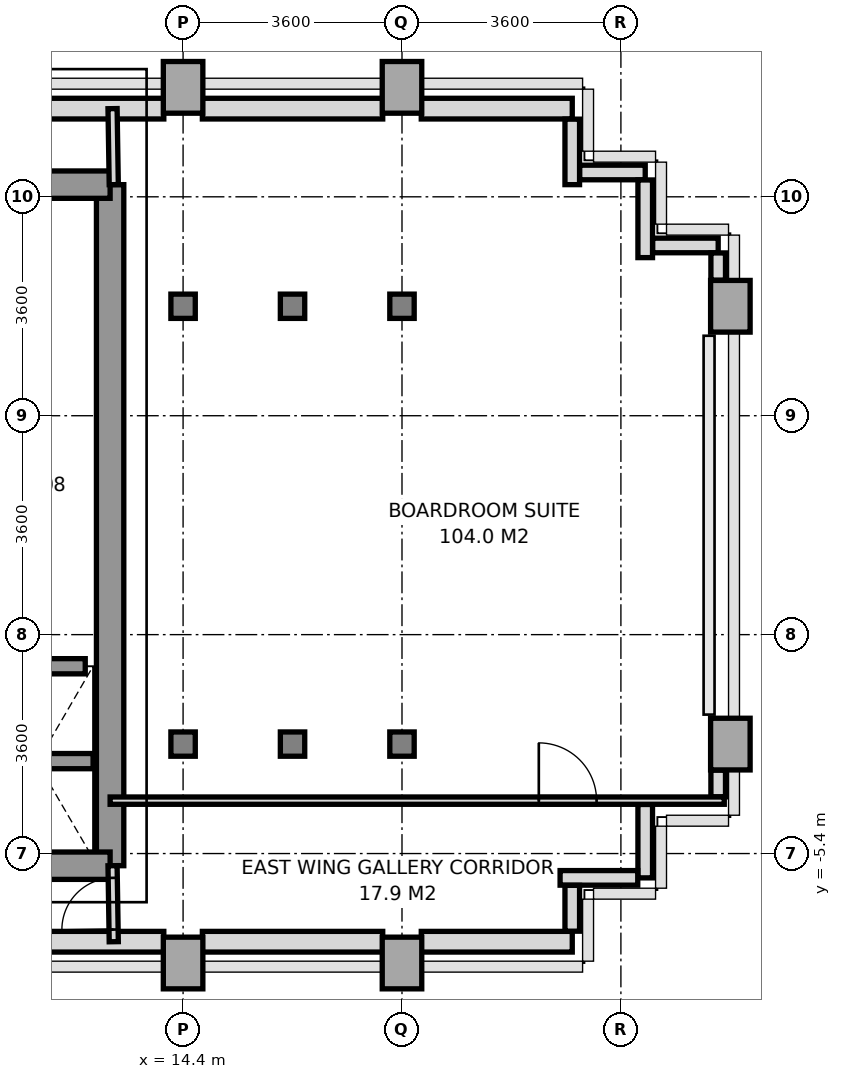
"""IFC4 building model, lengths in metres.
Left out: names, types, materials, properties, quantities, classifications, styles, units other than length and angle.
Written with IfcOpenShell. Run it as: python <this file> out.ifc"""

import sys

from ifc_helpers import new_model, si_unit, direction, frame, frame_2d, origin, origin_2d, place, context, subcontext, project, spatial, rectangle, i_section, extrude, source, transform, mapped, element, fill, save


model = new_model("IFC4")
c1 = context("Model", 3, precision=1e-05, world=origin(), true_north=direction((0.0, 1.0)))
c2 = subcontext(c1, "Body", "Model", "MODEL_VIEW")
j1 = project(units=[si_unit("LENGTHUNIT", "METRE"), si_unit("PLANEANGLEUNIT", "RADIAN")], contexts=[c1])
p1 = place(None, origin())
s1 = spatial("IfcSite", under=j1, at=p1, CompositionType="ELEMENT")
p2 = place(p1, origin())
s2 = spatial("IfcBuilding", under=s1, at=p2, CompositionType="ELEMENT")
p3 = place(p2, frame((0.0, 0.0, 97.2)))
s3 = spatial("IfcBuildingStorey", under=s2, at=p3, CompositionType="ELEMENT", Elevation=97.2)
m1 = source(origin(), c2, "Body", "SweptSolid", [
    extrude(rectangle(XDim=0.65, YDim=0.85, at=origin_2d()), origin(), (0.0, 0.0, 1.0), 3.2),
])
p4 = place(p3, frame((14.4, -7.2, 0.0), z_axis=(0.0, 0.0, 1.0), x_axis=(1.0, 0.0, 0.0)))
e1 = element("IfcColumn", 1, at=p4, inside=s3, PredefinedType="COLUMN", context=c2, shape_type="MappedRepresentation", body=[
    mapped(m1, transform((0.0, 0.0, 0.0), x_axis=(1.0, 0.0, 0.0), y_axis=(0.0, 1.0, 0.0), z_axis=(0.0, 0.0, 1.0), scale=1.0)),
])
m2 = source(origin(), c2, "Body", "SweptSolid", [
    extrude(i_section(OverallWidth=0.401, OverallDepth=0.399, WebThickness=0.02, FlangeThickness=0.032, at=origin_2d()), origin(), (0.0, 0.0, 1.0), 3.2),
])
for number, where, z_axis, x_axis in (
    (2, (14.4, -3.6, 0.0), (0.0, 0.0, 1.0), (1.0, 0.0, 0.0)),
    (3, (14.4, 3.6, 0.0), (0.0, 0.0, 1.0), (1.0, 0.0, 0.0)),
):
    element("IfcColumn", number, at=place(p3, frame(where, z_axis=z_axis, x_axis=x_axis)), inside=s3, PredefinedType="COLUMN", context=c2, shape_type="MappedRepresentation", body=[
        mapped(m2, transform((0.0, 0.0, 0.0), x_axis=(1.0, 0.0, 0.0), y_axis=(0.0, 1.0, 0.0), z_axis=(0.0, 0.0, 1.0), scale=1.0)),
    ])
p5 = place(p3, frame((14.4, 7.2, 0.0), z_axis=(0.0, 0.0, 1.0), x_axis=(1.0, 0.0, 0.0)))
e4 = element("IfcColumn", 4, at=p5, inside=s3, PredefinedType="COLUMN", context=c2, shape_type="MappedRepresentation", body=[
    mapped(m1, transform((0.0, 0.0, 0.0), x_axis=(1.0, 0.0, 0.0), y_axis=(0.0, 1.0, 0.0), z_axis=(0.0, 0.0, 1.0), scale=1.0)),
])
for number, where, z_axis, x_axis in (
    (5, (16.2, -3.6, 0.0), (0.0, 0.0, 1.0), (1.0, 0.0, 0.0)),
    (6, (16.2, 3.6, 0.0), (0.0, 0.0, 1.0), (1.0, 0.0, 0.0)),
):
    element("IfcColumn", number, at=place(p3, frame(where, z_axis=z_axis, x_axis=x_axis)), inside=s3, PredefinedType="COLUMN", context=c2, shape_type="MappedRepresentation", body=[
        mapped(m2, transform((0.0, 0.0, 0.0), x_axis=(1.0, 0.0, 0.0), y_axis=(0.0, 1.0, 0.0), z_axis=(0.0, 0.0, 1.0), scale=1.0)),
    ])
p6 = place(p3, frame((18.0, -7.2, 0.0), z_axis=(0.0, 0.0, 1.0), x_axis=(1.0, 0.0, 0.0)))
e7 = element("IfcColumn", 7, at=p6, inside=s3, PredefinedType="COLUMN", context=c2, shape_type="MappedRepresentation", body=[
    mapped(m1, transform((0.0, 0.0, 0.0), x_axis=(1.0, 0.0, 0.0), y_axis=(0.0, 1.0, 0.0), z_axis=(0.0, 0.0, 1.0), scale=1.0)),
])
for number, where, z_axis, x_axis in (
    (8, (18.0, -3.6, 0.0), (0.0, 0.0, 1.0), (1.0, 0.0, 0.0)),
    (9, (18.0, 3.6, 0.0), (0.0, 0.0, 1.0), (1.0, 0.0, 0.0)),
):
    element("IfcColumn", number, at=place(p3, frame(where, z_axis=z_axis, x_axis=x_axis)), inside=s3, PredefinedType="COLUMN", context=c2, shape_type="MappedRepresentation", body=[
        mapped(m2, transform((0.0, 0.0, 0.0), x_axis=(1.0, 0.0, 0.0), y_axis=(0.0, 1.0, 0.0), z_axis=(0.0, 0.0, 1.0), scale=1.0)),
    ])
for number, where, z_axis, x_axis in (
    (10, (18.0, 7.2, 0.0), (0.0, 0.0, 1.0), (1.0, 0.0, 0.0)),
    (11, (23.4, -3.6, 0.0), (0.0, 0.0, 1.0), (1.0, 0.0, 0.0)),
    (12, (23.4, 3.6, 0.0), (0.0, 0.0, 1.0), (1.0, 0.0, 0.0)),
):
    element("IfcColumn", number, at=place(p3, frame(where, z_axis=z_axis, x_axis=x_axis)), inside=s3, PredefinedType="COLUMN", context=c2, shape_type="MappedRepresentation", body=[
        mapped(m1, transform((0.0, 0.0, 0.0), x_axis=(1.0, 0.0, 0.0), y_axis=(0.0, 1.0, 0.0), z_axis=(0.0, 0.0, 1.0), scale=1.0)),
    ])
p7 = place(p3, frame((11.498, 6.85, 0.0), z_axis=(0.0, 0.0, 1.0), x_axis=(1.0, 0.0, 0.0)))
e13 = element("IfcWall", 13, at=p7, inside=s3, PredefinedType="SOLIDWALL", context=c2, shape_type="SweptSolid", body=[
    extrude(rectangle(XDim=2.585, YDim=0.34, at=frame_2d((1.292, 0.0))), origin(), (0.0, 0.0, 1.0), 3.2),
])
p8 = place(p3, frame((14.717, 6.85, 0.0), z_axis=(0.0, 0.0, 1.0), x_axis=(1.0, 0.0, 0.0)))
e14 = element("IfcWall", 14, at=p8, inside=s3, PredefinedType="SOLIDWALL", context=c2, shape_type="SweptSolid", body=[
    extrude(rectangle(XDim=2.966, YDim=0.34, at=frame_2d((1.483, 0.0))), origin(), (0.0, 0.0, 1.0), 2.45),
])
p9 = place(p3, frame((18.317, 6.85, 0.0), z_axis=(0.0, 0.0, 1.0), x_axis=(1.0, 0.0, 0.0)))
e15 = element("IfcWall", 15, at=p9, inside=s3, PredefinedType="SOLIDWALL", context=c2, shape_type="SweptSolid", body=[
    extrude(rectangle(XDim=2.483, YDim=0.34, at=frame_2d((1.242, 0.0))), origin(), (0.0, 0.0, 1.0), 3.2),
])
p10 = place(p3, frame((11.75, -6.85, 0.0), z_axis=(0.0, 0.0, 1.0), x_axis=(1.0, 0.0, 0.0)))
e16 = element("IfcWall", 16, at=p10, inside=s3, PredefinedType="SOLIDWALL", context=c2, shape_type="SweptSolid", body=[
    extrude(rectangle(XDim=2.333, YDim=0.34, at=frame_2d((1.167, 0.0))), origin(), (0.0, 0.0, 1.0), 3.2),
])
p11 = place(p3, frame((14.717, -6.85, 0.0), z_axis=(0.0, 0.0, 1.0), x_axis=(1.0, 0.0, 0.0)))
e17 = element("IfcWall", 17, at=p11, inside=s3, PredefinedType="SOLIDWALL", context=c2, shape_type="SweptSolid", body=[
    extrude(rectangle(XDim=2.966, YDim=0.34, at=frame_2d((1.483, 0.0))), origin(), (0.0, 0.0, 1.0), 2.45),
])
p12 = place(p3, frame((18.317, -6.85, 0.0), z_axis=(0.0, 0.0, 1.0), x_axis=(1.0, 0.0, 0.0)))
e18 = element("IfcWall", 18, at=p12, inside=s3, PredefinedType="SOLIDWALL", context=c2, shape_type="SweptSolid", body=[
    extrude(rectangle(XDim=2.483, YDim=0.34, at=frame_2d((1.242, 0.0))), origin(), (0.0, 0.0, 1.0), 3.2),
])
p13 = place(p3, frame((22.0, -4.593, 0.0), z_axis=(0.0, 0.0, 1.0), x_axis=(0.0, -1.0, 0.0)))
e19 = element("IfcWall", 19, at=p13, inside=s3, PredefinedType="PARAPET", context=c2, shape_type="SweptSolid", body=[
    extrude(rectangle(XDim=1.207, YDim=0.24, at=frame_2d((0.604, 0.0))), origin(), (0.0, 0.0, 1.0), 1.15),
])
p14 = place(p3, frame((21.877, -5.8, 0.0), z_axis=(0.0, 0.0, 1.0), x_axis=(-1.0, 0.0, 0.0)))
e20 = element("IfcWall", 20, at=p14, inside=s3, PredefinedType="PARAPET", context=c2, shape_type="SweptSolid", body=[
    extrude(rectangle(XDim=1.277, YDim=0.24, at=frame_2d((0.638, 0.0))), origin(), (0.0, 0.0, 1.0), 1.15),
])
p15 = place(p3, frame((20.8, -5.923, 0.0), z_axis=(0.0, 0.0, 1.0), x_axis=(0.0, -1.0, 0.0)))
e21 = element("IfcWall", 21, at=p15, inside=s3, PredefinedType="PARAPET", context=c2, shape_type="SweptSolid", body=[
    extrude(rectangle(XDim=0.754, YDim=0.24, at=frame_2d((0.377, 0.0))), origin(), (0.0, 0.0, 1.0), 1.15),
])
for number, where, z_axis, x_axis in (
    (22, (20.8, 6.677, 0.0), (0.0, 0.0, 1.0), (0.0, -1.0, 0.0)),
    (23, (20.923, 5.8, 0.0), (0.0, 0.0, 1.0), (1.0, 0.0, 0.0)),
):
    element("IfcWall", number, at=place(p3, frame(where, z_axis=z_axis, x_axis=x_axis)), inside=s3, PredefinedType="PARAPET", context=c2, shape_type="SweptSolid", body=[
        extrude(rectangle(XDim=1.077, YDim=0.24, at=frame_2d((0.539, 0.0))), origin(), (0.0, 0.0, 1.0), 1.15),
    ])
p16 = place(p3, frame((22.0, 5.677, 0.0), z_axis=(0.0, 0.0, 1.0), x_axis=(0.0, -1.0, 0.0)))
e24 = element("IfcWall", 24, at=p16, inside=s3, PredefinedType="PARAPET", context=c2, shape_type="SweptSolid", body=[
    extrude(rectangle(XDim=1.277, YDim=0.24, at=frame_2d((0.639, 0.0))), origin(), (0.0, 0.0, 1.0), 1.15),
])
p17 = place(p3, frame((22.123, 4.6, 0.0), z_axis=(0.0, 0.0, 1.0), x_axis=(1.0, 0.0, 0.0)))
e25 = element("IfcWall", 25, at=p17, inside=s3, PredefinedType="PARAPET", context=c2, shape_type="SweptSolid", body=[
    extrude(rectangle(XDim=1.077, YDim=0.24, at=frame_2d((0.539, 0.0))), origin(), (0.0, 0.0, 1.0), 1.15),
])
p18 = place(p3, frame((23.2, 4.477, 0.0), z_axis=(0.0, 0.0, 1.0), x_axis=(0.0, -1.0, 0.0)))
e26 = element("IfcWall", 26, at=p18, inside=s3, PredefinedType="PARAPET", context=c2, shape_type="SweptSolid", body=[
    extrude(rectangle(XDim=0.449, YDim=0.24, at=frame_2d((0.225, 0.0))), origin(), (0.0, 0.0, 1.0), 1.15),
])
p19 = place(p3, frame((23.2, -4.028, 0.0), z_axis=(0.0, 0.0, 1.0), x_axis=(0.0, -1.0, 0.0)))
e27 = element("IfcWall", 27, at=p19, inside=s3, PredefinedType="PARAPET", context=c2, shape_type="SweptSolid", body=[
    extrude(rectangle(XDim=0.439, YDim=0.24, at=frame_2d((0.219, 0.0))), origin(), (0.0, 0.0, 1.0), 1.15),
])
p20 = place(p3, frame((13.2, -5.6, 0.0), z_axis=(0.0, 0.0, 1.0), x_axis=(0.0, 1.0, 0.0)))
e28 = element("IfcWall", 28, at=p20, inside=s3, PredefinedType="SHEAR", context=c2, shape_type="SweptSolid", body=[
    extrude(rectangle(XDim=11.2, YDim=0.45, at=frame_2d((5.6, 0.0))), origin(), (0.0, 0.0, 1.0), 3.2),
])
p21 = place(p3, frame((11.381, 5.6, 0.0), z_axis=(0.0, 0.0, 1.0), x_axis=(1.0, 0.0, 0.0)))
e29 = element("IfcWall", 29, at=p21, inside=s3, PredefinedType="SHEAR", context=c2, shape_type="SweptSolid", body=[
    extrude(rectangle(XDim=1.819, YDim=0.45, at=frame_2d((0.909, 0.0))), origin(), (0.0, 0.0, 1.0), 3.2),
])
p22 = place(p3, frame((5.4, -5.6, 0.0), z_axis=(0.0, 0.0, 1.0), x_axis=(1.0, 0.0, 0.0)))
e30 = element("IfcWall", 30, at=p22, inside=s3, PredefinedType="SHEAR", context=c2, shape_type="SweptSolid", body=[
    extrude(rectangle(XDim=7.8, YDim=0.45, at=frame_2d((3.9, 0.0))), origin(), (0.0, 0.0, 1.0), 3.2),
])
p23 = place(p22, frame((3.0, 0.0, 0.0)))
e31 = element("IfcOpeningElement", 31, at=p23, cuts=e30, PredefinedType="OPENING", context=c2, shape_type="SweptSolid", body=[
    extrude(rectangle(XDim=1.2, YDim=2.2, at=frame_2d((0.6, 1.1))), frame((0.0, 0.235, 0.0), z_axis=(0.0, -1.0, 0.0), x_axis=(1.0, 0.0, 0.0)), (0.0, 0.0, 1.0), 0.47),
])
p24 = place(p3, frame((11.08, -3.88, 0.0), z_axis=(0.0, 0.0, 1.0), x_axis=(1.0, 0.0, 0.0)))
e32 = element("IfcWall", 32, at=p24, inside=s3, PredefinedType="SOLIDWALL", context=c2, shape_type="SweptSolid", body=[
    extrude(rectangle(XDim=1.84, YDim=0.25, at=frame_2d((0.92, 0.0))), origin(), (0.0, 0.0, 1.0), 3.2),
])
p25 = place(p3, frame((11.209, -2.32, 0.0), z_axis=(0.0, 0.0, 1.0), x_axis=(1.0, 0.0, 0.0)))
e33 = element("IfcWall", 33, at=p25, inside=s3, PredefinedType="SOLIDWALL", context=c2, shape_type="SweptSolid", body=[
    extrude(rectangle(XDim=1.582, YDim=0.25, at=frame_2d((0.791, 0.0))), origin(), (0.0, 0.0, 1.0), 3.2),
])
p26 = place(p3, frame((13.26, 5.6, 0.0), z_axis=(0.0, 0.0, 1.0), x_axis=(-0.016013571389, 0.999871774545, 0.0)))
e34 = element("IfcWall", 34, at=p26, inside=s3, PredefinedType="PARTITIONING", context=c2, shape_type="SweptSolid", body=[
    extrude(rectangle(XDim=1.25, YDim=0.15, at=frame_2d((0.625, 0.0))), origin(), (0.0, 0.0, 1.0), 3.2),
])
p27 = place(p3, frame((13.26, -6.85, 0.0), z_axis=(0.0, 0.0, 1.0), x_axis=(-0.016013571389, 0.999871774545, 0.0)))
e35 = element("IfcWall", 35, at=p27, inside=s3, PredefinedType="PARTITIONING", context=c2, shape_type="SweptSolid", body=[
    extrude(rectangle(XDim=1.25, YDim=0.15, at=frame_2d((0.625, 0.0))), origin(), (0.0, 0.0, 1.0), 3.2),
])
p28 = place(p27, frame((0.2, 0.0, 0.0)))
e36 = element("IfcOpeningElement", 36, at=p28, cuts=e35, PredefinedType="OPENING", context=c2, shape_type="SweptSolid", body=[
    extrude(rectangle(XDim=0.85, YDim=2.1, at=frame_2d((0.425, 1.05))), frame((0.0, 0.085, 0.0), z_axis=(0.0, -1.0, 0.0), x_axis=(1.0, 0.0, 0.0)), (0.0, 0.0, 1.0), 0.17),
])
p29 = place(p3, frame((13.2, -4.53, 0.0), z_axis=(0.0, 0.0, 1.0), x_axis=(1.0, 0.0, 0.0)))
e37 = element("IfcWall", 37, at=p29, inside=s3, PredefinedType="PARTITIONING", context=c2, shape_type="SweptSolid", body=[
    extrude(rectangle(XDim=10.1, YDim=0.12, at=frame_2d((5.05, 0.0))), origin(), (0.0, 0.0, 1.0), 2.76),
])
p30 = place(p29, frame((7.05, 0.0, 0.0)))
e38 = element("IfcOpeningElement", 38, at=p30, cuts=e37, PredefinedType="OPENING", context=c2, shape_type="SweptSolid", body=[
    extrude(rectangle(XDim=0.95, YDim=2.15, at=frame_2d((0.475, 1.075))), frame((0.0, 0.07, 0.0), z_axis=(0.0, -1.0, 0.0), x_axis=(1.0, 0.0, 0.0)), (0.0, 0.0, 1.0), 0.14),
])
m3 = source(origin(), c2, "Body", "SweptSolid", [
    extrude(rectangle(XDim=0.85, YDim=2.1, at=frame_2d((0.425, 1.05))), frame((0.0, 0.025, 0.0), z_axis=(0.0, -1.0, 0.0), x_axis=(1.0, 0.0, 0.0)), (0.0, 0.0, 1.0), 0.05),
])
p31 = place(p28, origin())
e39 = element("IfcDoor", 39, at=p31, inside=s3, OperationType="SINGLE_SWING_LEFT", PredefinedType="DOOR", context=c2, shape_type="MappedRepresentation", body=[
    mapped(m3, transform((0.0, 0.0, 0.0), x_axis=(1.0, 0.0, 0.0), y_axis=(0.0, 1.0, 0.0), z_axis=(0.0, 0.0, 1.0), scale=1.0)),
])
fill(e36, e39)
m4 = source(origin(), c2, "Body", "SweptSolid", [
    extrude(rectangle(XDim=0.95, YDim=2.15, at=frame_2d((0.475, 1.075))), frame((0.0, 0.025, 0.0), z_axis=(0.0, -1.0, 0.0), x_axis=(1.0, 0.0, 0.0)), (0.0, 0.0, 1.0), 0.05),
])
p32 = place(p30, origin())
e40 = element("IfcDoor", 40, at=p32, inside=s3, OperationType="SINGLE_SWING_LEFT", PredefinedType="DOOR", context=c2, shape_type="MappedRepresentation", body=[
    mapped(m4, transform((0.0, 0.0, 0.0), x_axis=(1.0, 0.0, 0.0), y_axis=(0.0, 1.0, 0.0), z_axis=(0.0, 0.0, 1.0), scale=1.0)),
])
fill(e38, e40)
save(model, sys.argv[1])
